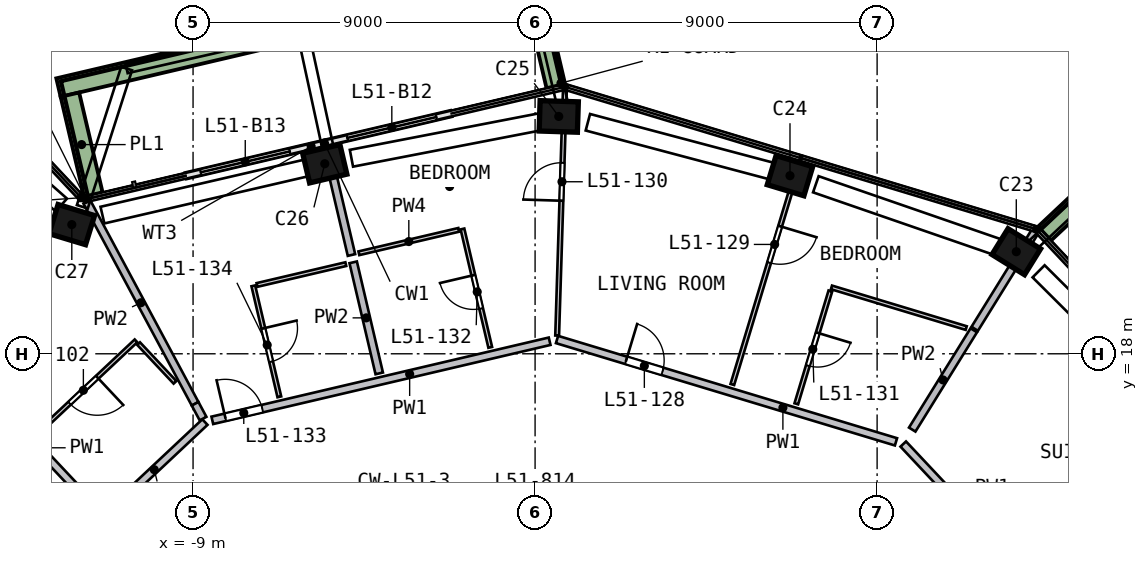
"""IFC4 building model, lengths in metres.
Left out: names, types, materials, properties, quantities, classifications, styles, units other than length and angle.
Written with IfcOpenShell. Run it as: python <this file> out.ifc"""

import sys

from ifc_helpers import new_model, si_unit, direction, frame, frame_2d, origin, origin_2d, place, context, subcontext, project, spatial, rectangle, extrude, element, fill, save


model = new_model("IFC4")
c1 = context("Model", 3, precision=1e-05, world=origin(), true_north=direction((0.0, 1.0)))
c2 = subcontext(c1, "Body", "Model", "MODEL_VIEW")
j1 = project(units=[si_unit("LENGTHUNIT", "METRE"), si_unit("PLANEANGLEUNIT", "RADIAN")], contexts=[c1])
p1 = place(None, origin())
s1 = spatial("IfcSite", under=j1, at=p1, CompositionType="ELEMENT")
p2 = place(p1, origin())
s2 = spatial("IfcBuilding", under=s1, at=p2, CompositionType="ELEMENT")
p3 = place(p2, frame((0.0, 0.0, 209.0)))
s3 = spatial("IfcBuildingStorey", under=s2, at=p3, CompositionType="ELEMENT", Elevation=209.0)
p4 = place(p3, frame((12.781, 20.614, 0.0), z_axis=(-0.0985271, 0.059906909, 0.993329539), x_axis=(0.844341944, -0.523250609, 0.115306034)))
e1 = element("IfcColumn", 1, at=p4, inside=s3, PredefinedType="COLUMN", context=c2, shape_type="SweptSolid", body=[
    extrude(rectangle(XDim=1.0, YDim=0.8, at=origin_2d()), origin(), (0.0, 0.0, 1.0), 3.211),
])
p5 = place(p3, frame((6.838, 22.649, 0.0), z_axis=(-0.107989012, 0.031560169, 0.99365101), x_axis=(-0.951355255, 0.286821212, -0.112502316)))
e2 = element("IfcColumn", 2, at=p5, inside=s3, PredefinedType="COLUMN", context=c2, shape_type="SweptSolid", body=[
    extrude(rectangle(XDim=1.0, YDim=0.8, at=origin_2d()), origin(), (0.0, 0.0, 1.0), 3.21),
])
p6 = place(p3, frame((0.762, 24.243, 0.0), z_axis=(-0.115327752, 0.002660825, 0.99332393), x_axis=(0.992829822, -0.031341998, 0.11535434)))
e3 = element("IfcColumn", 3, at=p6, inside=s3, PredefinedType="COLUMN", context=c2, shape_type="SweptSolid", body=[
    extrude(rectangle(XDim=1.0, YDim=0.8, at=origin_2d()), origin(), (0.0, 0.0, 1.0), 3.211),
])
p7 = place(p3, frame((-5.402, 23.033, 0.0), z_axis=(-0.109357343, -0.026616878, 0.99364607), x_axis=(-0.967420011, -0.226786103, -0.112545929)))
e4 = element("IfcColumn", 4, at=p7, inside=s3, PredefinedType="COLUMN", context=c2, shape_type="SweptSolid", body=[
    extrude(rectangle(XDim=1.0, YDim=0.8, at=origin_2d()), origin(), (0.0, 0.0, 1.0), 3.21),
])
p8 = place(p3, frame((-12.068, 21.47, 0.0), z_axis=(-0.101621973, -0.058297721, 0.993113463), x_axis=(0.952342438, -0.294306074, 0.080173663)))
e5 = element("IfcColumn", 5, at=p8, inside=s3, PredefinedType="COLUMN", context=c2, shape_type="SweptSolid", body=[
    extrude(rectangle(XDim=1.0, YDim=0.8, at=origin_2d()), origin(), (0.0, 0.0, 1.0), 3.212),
])
p9 = place(p3, frame((-2.212, 24.321, 0.0), z_axis=(0.0, 0.0, 1.0), x_axis=(-0.973578906, -0.228350857, 0.0)))
e6 = element("IfcWall", 6, at=p9, inside=s3, PredefinedType="SOLIDWALL", context=c2, shape_type="SweptSolid", body=[
    extrude(rectangle(XDim=3.4, YDim=0.15, at=frame_2d((1.7, 0.0))), origin(), (0.0, 0.0, 1.0), 2.475),
])
p10 = place(p9, frame((0.4, 0.0, 0.0)))
e7 = element("IfcOpeningElement", 7, at=p10, cuts=e6, PredefinedType="OPENING", context=c2, shape_type="SweptSolid", body=[
    extrude(rectangle(XDim=2.4, YDim=2.4, at=frame_2d((1.2, 1.2))), frame((0.0, 0.085, 0.0), z_axis=(0.0, -1.0, 0.0), x_axis=(1.0, 0.0, 0.0)), (0.0, 0.0, 1.0), 0.17),
])
p11 = place(p3, frame((-5.522, 23.544, 0.0), z_axis=(0.0, 0.0, 1.0), x_axis=(-0.973578668, -0.228351874, 0.0)))
e8 = element("IfcWall", 8, at=p11, inside=s3, PredefinedType="SOLIDWALL", context=c2, shape_type="SweptSolid", body=[
    extrude(rectangle(XDim=3.761, YDim=0.15, at=frame_2d((1.881, 0.0))), origin(), (0.0, 0.0, 1.0), 2.475),
])
p12 = place(p11, frame((0.961, 0.0, 0.0)))
e9 = element("IfcOpeningElement", 9, at=p12, cuts=e8, PredefinedType="OPENING", context=c2, shape_type="SweptSolid", body=[
    extrude(rectangle(XDim=2.4, YDim=2.4, at=frame_2d((1.2, 1.2))), frame((0.0, 0.085, 0.0), z_axis=(0.0, -1.0, 0.0), x_axis=(1.0, 0.0, 0.0)), (0.0, 0.0, 1.0), 0.17),
])
p13 = place(p3, frame((15.373, 23.01, 0.0), z_axis=(0.0, 0.0, 1.0), x_axis=(-0.728964327, -0.684551685, 0.0)))
e10 = element("IfcWall", 10, at=p13, inside=s3, PredefinedType="SOLIDWALL", context=c2, shape_type="SweptSolid", body=[
    extrude(rectangle(XDim=2.699, YDim=0.5, at=frame_2d((1.35, 0.0))), origin(), (0.0, 0.0, 1.0), 0.7),
])
p14 = place(p3, frame((0.545, 25.046, 0.0), z_axis=(0.0, 0.0, 1.0), x_axis=(-0.228341659, 0.973581063, 0.0)))
e11 = element("IfcWall", 11, at=p14, inside=s3, PredefinedType="SOLIDWALL", context=c2, shape_type="SweptSolid", body=[
    extrude(rectangle(XDim=3.199, YDim=0.5, at=frame_2d((1.6, 0.0))), origin(), (0.0, 0.0, 1.0), 0.7),
])
p15 = place(p3, frame((-0.372, 27.86, 0.0), z_axis=(0.0, 0.0, 1.0), x_axis=(-0.973576768, -0.228359973, 0.0)))
e12 = element("IfcWall", 12, at=p15, inside=s3, PredefinedType="SOLIDWALL", context=c2, shape_type="SweptSolid", body=[
    extrude(rectangle(XDim=12.5, YDim=0.5, at=frame_2d((6.25, 0.0))), origin(), (0.0, 0.0, 1.0), 0.7),
])
p16 = place(p3, frame((-12.241, 24.819, 0.0), z_axis=(0.0, 0.0, 1.0), x_axis=(0.228313242, -0.973587728, 0.0)))
e13 = element("IfcWall", 13, at=p16, inside=s3, PredefinedType="SOLIDWALL", context=c2, shape_type="SweptSolid", body=[
    extrude(rectangle(XDim=2.699, YDim=0.5, at=frame_2d((1.35, 0.0))), origin(), (0.0, 0.0, 1.0), 0.7),
])
p17 = place(p3, frame((-17.937, 20.708, 0.0), z_axis=(0.0, 0.0, 1.0), x_axis=(0.684548977, -0.728966871, 0.0)))
e14 = element("IfcWall", 14, at=p17, inside=s3, PredefinedType="SOLIDWALL", context=c2, shape_type="SweptSolid", body=[
    extrude(rectangle(XDim=9.416, YDim=0.2, at=frame_2d((4.708, 0.0))), origin(), (0.0, 0.0, 1.0), 3.19),
])
p18 = place(p17, frame((3.6, 0.0, 0.0)))
e15 = element("IfcOpeningElement", 15, at=p18, cuts=e14, PredefinedType="OPENING", context=c2, shape_type="SweptSolid", body=[
    extrude(rectangle(XDim=1.0, YDim=2.1, at=frame_2d((0.5, 1.05))), frame((0.0, 0.11, 0.0), z_axis=(0.0, -1.0, 0.0), x_axis=(1.0, 0.0, 0.0)), (0.0, 0.0, 1.0), 0.22),
])
p19 = place(p3, frame((-8.688, 16.203, 0.0), z_axis=(0.0, 0.0, 1.0), x_axis=(-0.728947972, -0.684569101, 0.0)))
e16 = element("IfcWall", 16, at=p19, inside=s3, PredefinedType="SOLIDWALL", context=c2, shape_type="SweptSolid", body=[
    extrude(rectangle(XDim=3.658, YDim=0.2, at=frame_2d((1.829, 0.0))), origin(), (0.0, 0.0, 1.0), 3.19),
])
p20 = place(p3, frame((-8.493, 16.248, 0.0), z_axis=(0.0, 0.0, 1.0), x_axis=(0.973578833, 0.228351168, 0.0)))
e17 = element("IfcWall", 17, at=p20, inside=s3, PredefinedType="SOLIDWALL", context=c2, shape_type="SweptSolid", body=[
    extrude(rectangle(XDim=9.117, YDim=0.2, at=frame_2d((4.558, 0.0))), origin(), (0.0, 0.0, 1.0), 3.19),
])
p21 = place(p20, frame((0.35, 0.0, 0.0)))
e18 = element("IfcOpeningElement", 18, at=p21, cuts=e17, PredefinedType="OPENING", context=c2, shape_type="SweptSolid", body=[
    extrude(rectangle(XDim=1.0, YDim=2.1, at=frame_2d((0.5, 1.05))), frame((0.0, 0.11, 0.0), z_axis=(0.0, -1.0, 0.0), x_axis=(1.0, 0.0, 0.0)), (0.0, 0.0, 1.0), 0.22),
])
p22 = place(p3, frame((0.577, 18.376, 0.0), z_axis=(0.0, 0.0, 1.0), x_axis=(0.957319229, -0.289032685, 0.0)))
e19 = element("IfcWall", 19, at=p22, inside=s3, PredefinedType="SOLIDWALL", context=c2, shape_type="SweptSolid", body=[
    extrude(rectangle(XDim=9.317, YDim=0.2, at=frame_2d((4.658, 0.0))), origin(), (0.0, 0.0, 1.0), 3.19),
])
p23 = place(p22, frame((1.9, 0.0, 0.0)))
e20 = element("IfcOpeningElement", 20, at=p23, cuts=e19, PredefinedType="OPENING", context=c2, shape_type="SweptSolid", body=[
    extrude(rectangle(XDim=1.0, YDim=2.1, at=frame_2d((0.5, 1.05))), frame((0.0, 0.11, 0.0), z_axis=(0.0, -1.0, 0.0), x_axis=(1.0, 0.0, 0.0)), (0.0, 0.0, 1.0), 0.22),
])
p24 = place(p3, frame((9.688, 15.625, 0.0), z_axis=(0.0, 0.0, 1.0), x_axis=(0.684549323, -0.728966545, 0.0)))
e21 = element("IfcWall", 21, at=p24, inside=s3, PredefinedType="SOLIDWALL", context=c2, shape_type="SweptSolid", body=[
    extrude(rectangle(XDim=9.317, YDim=0.2, at=frame_2d((4.658, 0.0))), origin(), (0.0, 0.0, 1.0), 3.19),
])
p25 = place(p24, frame((5.15, 0.0, 0.0)))
e22 = element("IfcOpeningElement", 22, at=p25, cuts=e21, PredefinedType="OPENING", context=c2, shape_type="SweptSolid", body=[
    extrude(rectangle(XDim=1.0, YDim=2.1, at=frame_2d((0.5, 1.05))), frame((0.0, 0.11, 0.0), z_axis=(0.0, -1.0, 0.0), x_axis=(1.0, 0.0, 0.0)), (0.0, 0.0, 1.0), 0.22),
])
p26 = place(p3, frame((-11.797, 22.001, 0.0), z_axis=(0.0, 0.0, 1.0), x_axis=(0.472578543, -0.881288557, 0.0)))
e23 = element("IfcWall", 23, at=p26, inside=s3, PredefinedType="SOLIDWALL", context=c2, shape_type="SweptSolid", body=[
    extrude(rectangle(XDim=6.032, YDim=0.2, at=frame_2d((3.016, 0.0))), origin(), (0.0, 0.0, 1.0), 3.19),
])
p27 = place(p3, frame((-8.946, 16.685, 0.0), z_axis=(0.0, 0.0, 1.0), x_axis=(0.471900865, -0.881651617, 0.0)))
e24 = element("IfcWall", 24, at=p27, inside=s3, PredefinedType="SOLIDWALL", context=c2, shape_type="SweptSolid", body=[
    extrude(rectangle(XDim=0.444, YDim=0.2, at=frame_2d((0.222, 0.0))), origin(), (0.0, 0.0, 1.0), 3.19),
])
p28 = place(p3, frame((-4.832, 20.599, 0.0), z_axis=(0.0, 0.0, 1.0), x_axis=(-0.228333511, 0.973582974, 0.0)))
e25 = element("IfcWall", 25, at=p28, inside=s3, PredefinedType="SOLIDWALL", context=c2, shape_type="SweptSolid", body=[
    extrude(rectangle(XDim=2.95, YDim=0.2, at=frame_2d((1.475, 0.0))), origin(), (0.0, 0.0, 1.0), 3.19),
])
p29 = place(p3, frame((-4.101, 17.484, 0.0), z_axis=(0.0, 0.0, 1.0), x_axis=(-0.228368392, 0.973574793, 0.0)))
e26 = element("IfcWall", 26, at=p29, inside=s3, PredefinedType="SOLIDWALL", context=c2, shape_type="SweptSolid", body=[
    extrude(rectangle(XDim=3.002, YDim=0.2, at=frame_2d((1.501, 0.0))), origin(), (0.0, 0.0, 1.0), 3.19),
])
p30 = place(p3, frame((9.924, 16.005, 0.0), z_axis=(0.0, 0.0, 1.0), x_axis=(0.526969492, 0.849884201, 0.0)))
e27 = element("IfcWall", 27, at=p30, inside=s3, PredefinedType="SOLIDWALL", context=c2, shape_type="SweptSolid", body=[
    extrude(rectangle(XDim=3.075, YDim=0.2, at=frame_2d((1.538, 0.0))), origin(), (0.0, 0.0, 1.0), 3.19),
])
p31 = place(p3, frame((11.568, 18.657, 0.0), z_axis=(0.0, 0.0, 1.0), x_axis=(0.526912729, 0.849919394, 0.0)))
e28 = element("IfcWall", 28, at=p31, inside=s3, PredefinedType="SOLIDWALL", context=c2, shape_type="SweptSolid", body=[
    extrude(rectangle(XDim=3.011, YDim=0.2, at=frame_2d((1.506, 0.0))), origin(), (0.0, 0.0, 1.0), 3.19),
])
p32 = place(p3, frame((-10.501, 18.341, 0.0), z_axis=(0.0, 0.0, 1.0), x_axis=(-0.728934207, -0.684583758, 0.0)))
e29 = element("IfcWall", 29, at=p32, inside=s3, PredefinedType="PARTITIONING", context=c2, shape_type="SweptSolid", body=[
    extrude(rectangle(XDim=3.6, YDim=0.1, at=frame_2d((1.8, 0.0))), origin(), (0.0, 0.0, 1.0), 3.19),
])
p33 = place(p32, frame((1.4, 0.0, 0.0)))
e30 = element("IfcOpeningElement", 30, at=p33, cuts=e29, PredefinedType="OPENING", context=c2, shape_type="SweptSolid", body=[
    extrude(rectangle(XDim=1.0, YDim=2.1, at=frame_2d((0.5, 1.05))), frame((0.0, 0.06, 0.0), z_axis=(0.0, -1.0, 0.0), x_axis=(1.0, 0.0, 0.0)), (0.0, 0.0, 1.0), 0.12),
])
p34 = place(p3, frame((-10.433, 18.268, 0.0), z_axis=(0.0, 0.0, 1.0), x_axis=(0.684498399, -0.729014363, 0.0)))
e31 = element("IfcWall", 31, at=p34, inside=s3, PredefinedType="PARTITIONING", context=c2, shape_type="SweptSolid", body=[
    extrude(rectangle(XDim=1.398, YDim=0.1, at=frame_2d((0.699, 0.0))), origin(), (0.0, 0.0, 1.0), 3.19),
])
p35 = place(p3, frame((-7.415, 19.788, 0.0), z_axis=(0.0, 0.0, 1.0), x_axis=(0.228340776, -0.97358127, 0.0)))
e32 = element("IfcWall", 32, at=p35, inside=s3, PredefinedType="PARTITIONING", context=c2, shape_type="SweptSolid", body=[
    extrude(rectangle(XDim=3.0, YDim=0.1, at=frame_2d((1.5, 0.0))), origin(), (0.0, 0.0, 1.0), 3.19),
])
p36 = place(p35, frame((1.15, 0.0, 0.0)))
e33 = element("IfcOpeningElement", 33, at=p36, cuts=e32, PredefinedType="OPENING", context=c2, shape_type="SweptSolid", body=[
    extrude(rectangle(XDim=0.9, YDim=2.1, at=frame_2d((0.45, 1.05))), frame((0.0, 0.06, 0.0), z_axis=(0.0, -1.0, 0.0), x_axis=(1.0, 0.0, 0.0)), (0.0, 0.0, 1.0), 0.12),
])
p37 = place(p3, frame((-7.317, 19.811, 0.0), z_axis=(0.0, 0.0, 1.0), x_axis=(0.973570381, 0.2283872, 0.0)))
e34 = element("IfcWall", 34, at=p37, inside=s3, PredefinedType="PARTITIONING", context=c2, shape_type="SweptSolid", body=[
    extrude(rectangle(XDim=2.4, YDim=0.1, at=frame_2d((1.2, 0.0))), origin(), (0.0, 0.0, 1.0), 3.19),
])
p38 = place(p3, frame((-2.008, 21.261, 0.0), z_axis=(0.0, 0.0, 1.0), x_axis=(-0.973586482, -0.228318554, 0.0)))
e35 = element("IfcWall", 35, at=p38, inside=s3, PredefinedType="PARTITIONING", context=c2, shape_type="SweptSolid", body=[
    extrude(rectangle(XDim=2.7, YDim=0.1, at=frame_2d((1.35, 0.0))), origin(), (0.0, 0.0, 1.0), 3.19),
])
p39 = place(p3, frame((-1.18, 18.169, 0.0), z_axis=(0.0, 0.0, 1.0), x_axis=(-0.228346131, 0.973580014, 0.0)))
e36 = element("IfcWall", 36, at=p39, inside=s3, PredefinedType="PARTITIONING", context=c2, shape_type="SweptSolid", body=[
    extrude(rectangle(XDim=3.2, YDim=0.1, at=frame_2d((1.6, 0.0))), origin(), (0.0, 0.0, 1.0), 3.19),
])
p40 = place(p39, frame((1.05, 0.0, 0.0)))
e37 = element("IfcOpeningElement", 37, at=p40, cuts=e36, PredefinedType="OPENING", context=c2, shape_type="SweptSolid", body=[
    extrude(rectangle(XDim=0.9, YDim=2.1, at=frame_2d((0.45, 1.05))), frame((0.0, 0.06, 0.0), z_axis=(0.0, -1.0, 0.0), x_axis=(1.0, 0.0, 0.0)), (0.0, 0.0, 1.0), 0.12),
])
p41 = place(p3, frame((0.581, 18.479, 0.0), z_axis=(0.0, 0.0, 1.0), x_axis=(0.031404237, 0.999506765, 0.0)))
e38 = element("IfcWall", 38, at=p41, inside=s3, PredefinedType="PARTITIONING", context=c2, shape_type="SweptSolid", body=[
    extrude(rectangle(XDim=6.476, YDim=0.1, at=frame_2d((3.238, 0.0))), origin(), (0.0, 0.0, 1.0), 3.19),
])
p42 = place(p41, frame((3.55, 0.0, 0.0)))
e39 = element("IfcOpeningElement", 39, at=p42, cuts=e38, PredefinedType="OPENING", context=c2, shape_type="SweptSolid", body=[
    extrude(rectangle(XDim=1.0, YDim=2.1, at=frame_2d((0.5, 1.05))), frame((0.0, 0.06, 0.0), z_axis=(0.0, -1.0, 0.0), x_axis=(1.0, 0.0, 0.0)), (0.0, 0.0, 1.0), 0.12),
])
p43 = place(p3, frame((6.968, 23.079, 0.0), z_axis=(0.0, 0.0, 1.0), x_axis=(-0.289040974, -0.957316727, 0.0)))
e40 = element("IfcWall", 40, at=p43, inside=s3, PredefinedType="PARTITIONING", context=c2, shape_type="SweptSolid", body=[
    extrude(rectangle(XDim=6.15, YDim=0.1, at=frame_2d((3.075, 0.0))), origin(), (0.0, 0.0, 1.0), 3.19),
])
p44 = place(p43, frame((1.8, 0.0, 0.0)))
e41 = element("IfcOpeningElement", 41, at=p44, cuts=e40, PredefinedType="OPENING", context=c2, shape_type="SweptSolid", body=[
    extrude(rectangle(XDim=1.0, YDim=2.1, at=frame_2d((0.5, 1.05))), frame((0.0, 0.06, 0.0), z_axis=(0.0, -1.0, 0.0), x_axis=(1.0, 0.0, 0.0)), (0.0, 0.0, 1.0), 0.12),
])
p45 = place(p3, frame((7.77, 19.651, 0.0), z_axis=(0.0, 0.0, 1.0), x_axis=(-0.289023657, -0.957321955, 0.0)))
e42 = element("IfcWall", 42, at=p45, inside=s3, PredefinedType="PARTITIONING", context=c2, shape_type="SweptSolid", body=[
    extrude(rectangle(XDim=3.1, YDim=0.1, at=frame_2d((1.55, 0.0))), origin(), (0.0, 0.0, 1.0), 3.19),
])
p46 = place(p45, frame((1.15, 0.0, 0.0)))
e43 = element("IfcOpeningElement", 43, at=p46, cuts=e42, PredefinedType="OPENING", context=c2, shape_type="SweptSolid", body=[
    extrude(rectangle(XDim=0.9, YDim=2.1, at=frame_2d((0.45, 1.05))), frame((0.0, 0.06, 0.0), z_axis=(0.0, -1.0, 0.0), x_axis=(1.0, 0.0, 0.0)), (0.0, 0.0, 1.0), 0.12),
])
p47 = place(p3, frame((11.344, 18.677, 0.0), z_axis=(0.0, 0.0, 1.0), x_axis=(-0.957320485, 0.289028527, 0.0)))
e44 = element("IfcWall", 44, at=p47, inside=s3, PredefinedType="PARTITIONING", context=c2, shape_type="SweptSolid", body=[
    extrude(rectangle(XDim=3.704, YDim=0.1, at=frame_2d((1.852, 0.0))), origin(), (0.0, 0.0, 1.0), 3.19),
])
p48 = place(p10, origin())
e45 = element("IfcDoor", 45, at=p48, inside=s3, OperationType="SLIDING_TO_RIGHT", PredefinedType="DOOR", context=c2, shape_type="SweptSolid", body=[
    extrude(rectangle(XDim=2.4, YDim=2.4, at=frame_2d((1.2, 1.2))), frame((0.0, 0.025, 0.0), z_axis=(0.0, -1.0, 0.0), x_axis=(1.0, 0.0, 0.0)), (0.0, 0.0, 1.0), 0.05),
])
fill(e7, e45)
p49 = place(p12, origin())
e46 = element("IfcDoor", 46, at=p49, inside=s3, OperationType="SLIDING_TO_LEFT", PredefinedType="DOOR", context=c2, shape_type="SweptSolid", body=[
    extrude(rectangle(XDim=2.4, YDim=2.4, at=frame_2d((1.2, 1.2))), frame((0.0, 0.025, 0.0), z_axis=(0.0, -1.0, 0.0), x_axis=(1.0, 0.0, 0.0)), (0.0, 0.0, 1.0), 0.05),
])
fill(e9, e46)
p50 = place(p33, origin())
e47 = element("IfcDoor", 47, at=p50, inside=s3, OperationType="SINGLE_SWING_LEFT", PredefinedType="DOOR", context=c2, shape_type="SweptSolid", body=[
    extrude(rectangle(XDim=1.0, YDim=2.1, at=frame_2d((0.5, 1.05))), frame((0.0, 0.025, 0.0), z_axis=(0.0, -1.0, 0.0), x_axis=(1.0, 0.0, 0.0)), (0.0, 0.0, 1.0), 0.05),
])
fill(e30, e47)
p51 = place(p23, origin())
e48 = element("IfcDoor", 48, at=p51, inside=s3, OperationType="SINGLE_SWING_LEFT", PredefinedType="DOOR", context=c2, shape_type="SweptSolid", body=[
    extrude(rectangle(XDim=1.0, YDim=2.1, at=frame_2d((0.5, 1.05))), frame((0.0, 0.025, 0.0), z_axis=(0.0, -1.0, 0.0), x_axis=(1.0, 0.0, 0.0)), (0.0, 0.0, 1.0), 0.05),
])
fill(e20, e48)
p52 = place(p44, origin())
e49 = element("IfcDoor", 49, at=p52, inside=s3, OperationType="SINGLE_SWING_LEFT", PredefinedType="DOOR", context=c2, shape_type="SweptSolid", body=[
    extrude(rectangle(XDim=1.0, YDim=2.1, at=frame_2d((0.5, 1.05))), frame((0.0, 0.025, 0.0), z_axis=(0.0, -1.0, 0.0), x_axis=(1.0, 0.0, 0.0)), (0.0, 0.0, 1.0), 0.05),
])
fill(e41, e49)
p53 = place(p42, origin())
e50 = element("IfcDoor", 50, at=p53, inside=s3, OperationType="SINGLE_SWING_LEFT", PredefinedType="DOOR", context=c2, shape_type="SweptSolid", body=[
    extrude(rectangle(XDim=1.0, YDim=2.1, at=frame_2d((0.5, 1.05))), frame((0.0, 0.025, 0.0), z_axis=(0.0, -1.0, 0.0), x_axis=(1.0, 0.0, 0.0)), (0.0, 0.0, 1.0), 0.05),
])
fill(e39, e50)
p54 = place(p46, origin())
e51 = element("IfcDoor", 51, at=p54, inside=s3, OperationType="SINGLE_SWING_LEFT", PredefinedType="DOOR", context=c2, shape_type="SweptSolid", body=[
    extrude(rectangle(XDim=0.9, YDim=2.1, at=frame_2d((0.45, 1.05))), frame((0.0, 0.025, 0.0), z_axis=(0.0, -1.0, 0.0), x_axis=(1.0, 0.0, 0.0)), (0.0, 0.0, 1.0), 0.05),
])
fill(e43, e51)
p55 = place(p40, origin())
e52 = element("IfcDoor", 52, at=p55, inside=s3, OperationType="SINGLE_SWING_RIGHT", PredefinedType="DOOR", context=c2, shape_type="SweptSolid", body=[
    extrude(rectangle(XDim=0.9, YDim=2.1, at=frame_2d((0.45, 1.05))), frame((0.0, 0.025, 0.0), z_axis=(0.0, -1.0, 0.0), x_axis=(1.0, 0.0, 0.0)), (0.0, 0.0, 1.0), 0.05),
])
fill(e37, e52)
p56 = place(p21, origin())
e53 = element("IfcDoor", 53, at=p56, inside=s3, OperationType="SINGLE_SWING_LEFT", PredefinedType="DOOR", context=c2, shape_type="SweptSolid", body=[
    extrude(rectangle(XDim=1.0, YDim=2.1, at=frame_2d((0.5, 1.05))), frame((0.0, 0.025, 0.0), z_axis=(0.0, -1.0, 0.0), x_axis=(1.0, 0.0, 0.0)), (0.0, 0.0, 1.0), 0.05),
])
fill(e18, e53)
p57 = place(p36, origin())
e54 = element("IfcDoor", 54, at=p57, inside=s3, OperationType="SINGLE_SWING_LEFT", PredefinedType="DOOR", context=c2, shape_type="SweptSolid", body=[
    extrude(rectangle(XDim=0.9, YDim=2.1, at=frame_2d((0.45, 1.05))), frame((0.0, 0.025, 0.0), z_axis=(0.0, -1.0, 0.0), x_axis=(1.0, 0.0, 0.0)), (0.0, 0.0, 1.0), 0.05),
])
fill(e33, e54)
save(model, sys.argv[1])
